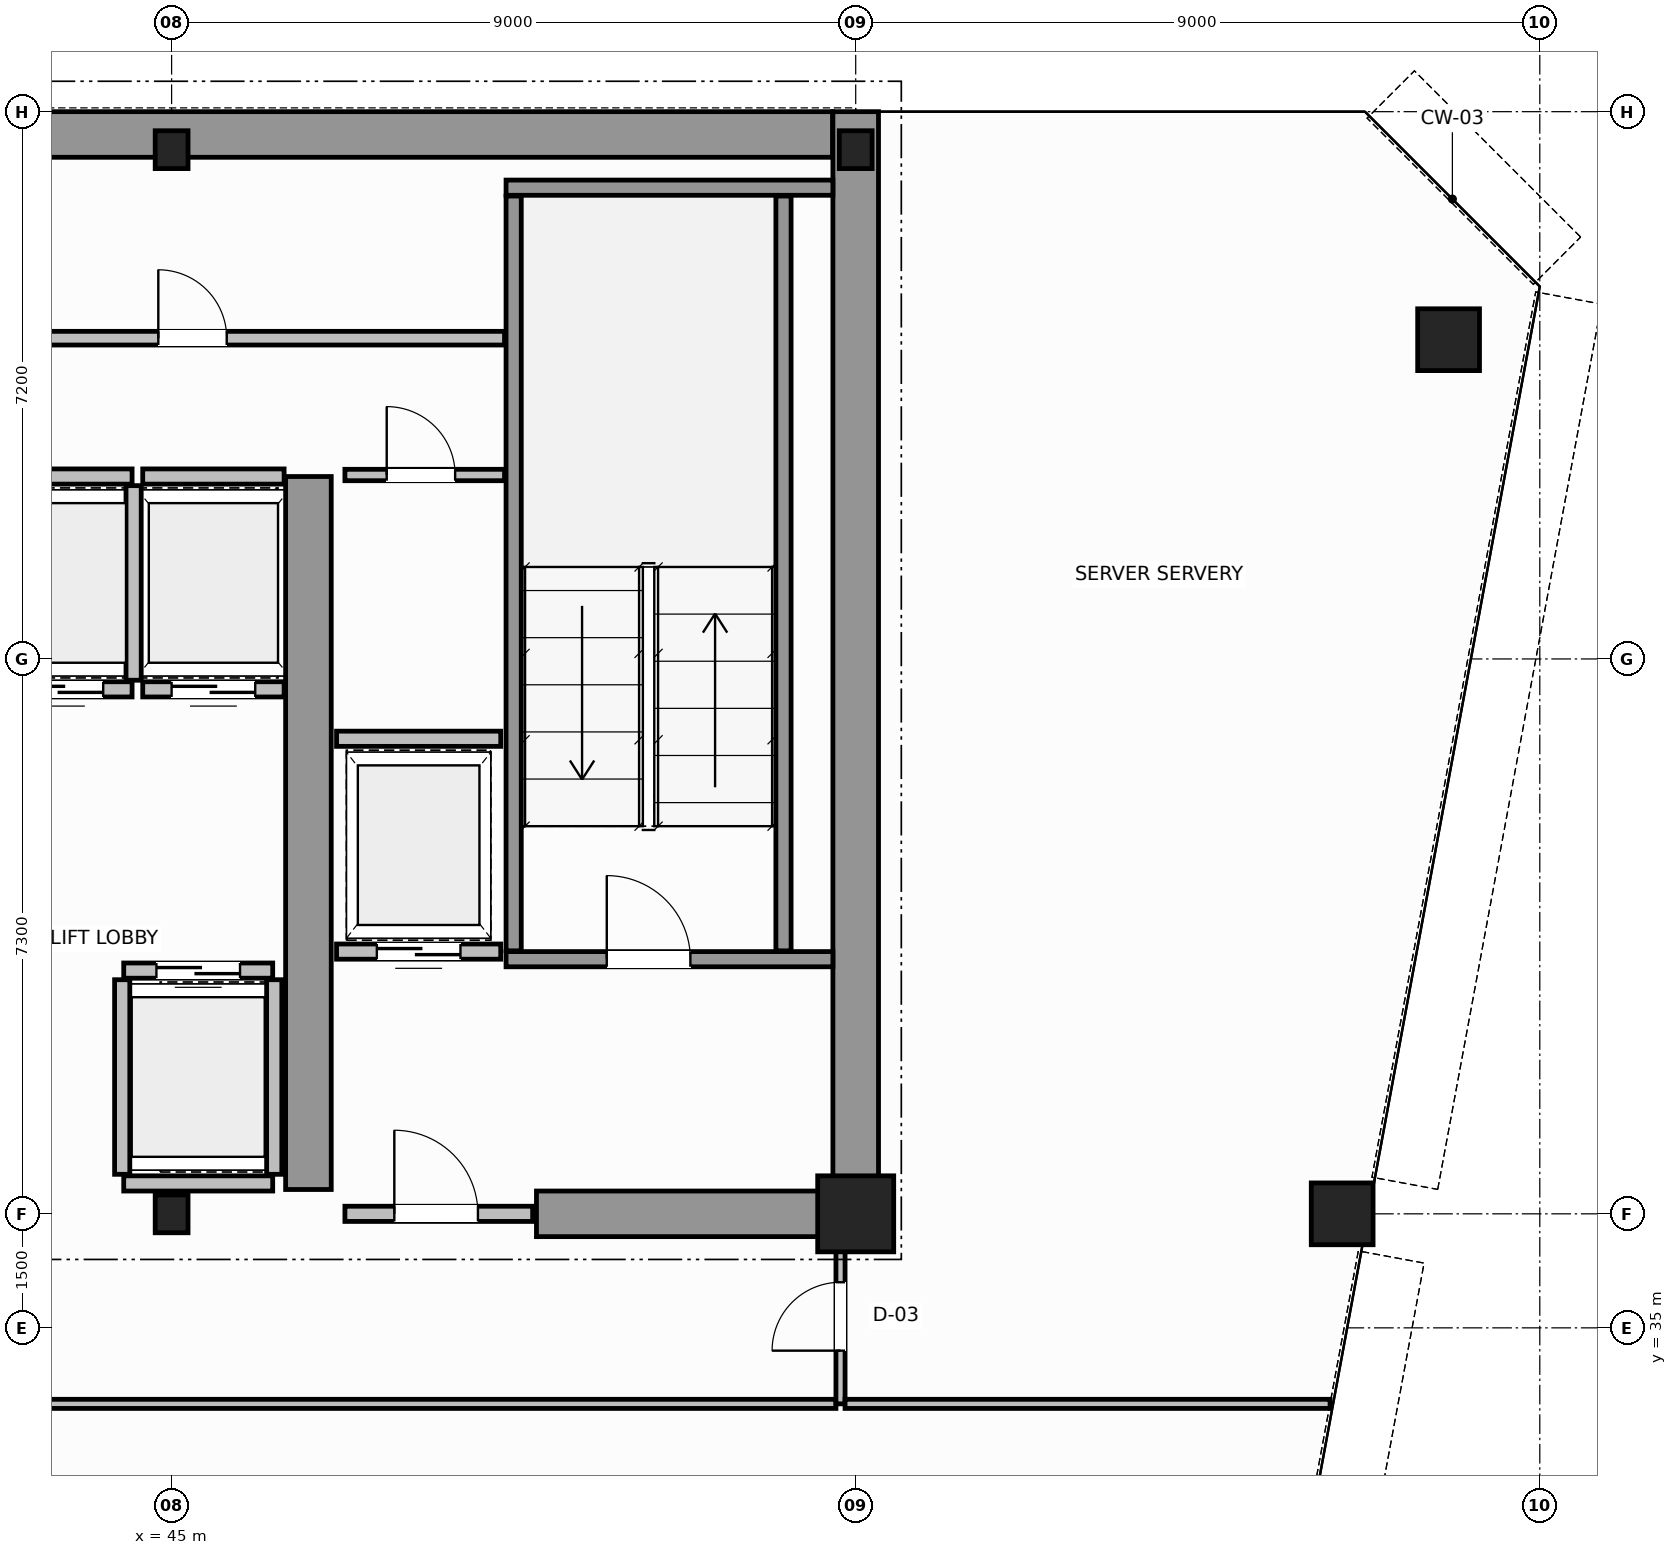
"""IFC4 building model, lengths in metres.
Left out: names, types, materials, properties, quantities, classifications, styles, units other than length and angle.
Written with IfcOpenShell. Run it as: python <this file> out.ifc"""

import sys

from ifc_helpers import new_model, si_unit, direction, frame, frame_2d, origin, origin_2d, place, context, subcontext, project, spatial, rectangle, hollow_circle, i_section, extrude, source, transform, mapped, element, fill, save


model = new_model("IFC4")
c1 = context("Model", 3, precision=1e-05, world=origin(), true_north=direction((0.0, 1.0)))
c2 = subcontext(c1, "Body", "Model", "MODEL_VIEW")
j1 = project(units=[si_unit("LENGTHUNIT", "METRE"), si_unit("PLANEANGLEUNIT", "RADIAN")], contexts=[c1])
p1 = place(None, origin())
s1 = spatial("IfcSite", under=j1, at=p1, CompositionType="ELEMENT")
p2 = place(p1, origin())
s2 = spatial("IfcBuilding", under=s1, at=p2, CompositionType="ELEMENT")
p3 = place(p2, frame((0.0, 0.0, 207.0)))
s3 = spatial("IfcBuildingStorey", under=s2, at=p3, CompositionType="ELEMENT", Elevation=207.0)
m1 = source(origin(), c2, "Body", "SweptSolid", [
    extrude(i_section(OverallWidth=0.432, OverallDepth=0.498, WebThickness=0.055, FlangeThickness=0.068, FilletRadius=0.015, at=origin_2d()), origin(), (0.0, 0.0, 1.0), 3.8),
])
p4 = place(p3, frame((45.0, 36.5, 0.0), z_axis=(0.0, 0.0, 1.0), x_axis=(1.0, 0.0, 0.0)))
e1 = element("IfcColumn", 1, at=p4, inside=s3, PredefinedType="COLUMN", context=c2, shape_type="MappedRepresentation", body=[
    mapped(m1, transform((0.0, 0.0, 0.0), scale=1.0)),
])
m2 = source(origin(), c2, "Body", "SweptSolid", [
    extrude(rectangle(XDim=1.0, YDim=1.0, at=origin_2d()), origin(), (0.0, 0.0, 1.0), 3.8),
])
p5 = place(p3, frame((54.0, 36.5, 0.0), z_axis=(0.0, 0.0, 1.0), x_axis=(1.0, 0.0, 0.0)))
e2 = element("IfcColumn", 2, at=p5, inside=s3, PredefinedType="COLUMN", context=c2, shape_type="MappedRepresentation", body=[
    mapped(m2, transform((0.0, 0.0, 0.0), scale=1.0)),
])
for number, where, z_axis, x_axis in (
    (3, (45.0, 50.5, 0.0), (0.0, 0.0, 1.0), (1.0, 0.0, 0.0)),
    (4, (54.0, 50.5, 0.0), (0.0, 0.0, 1.0), (1.0, 0.0, 0.0)),
):
    element("IfcColumn", number, at=place(p3, frame(where, z_axis=z_axis, x_axis=x_axis)), inside=s3, PredefinedType="COLUMN", context=c2, shape_type="MappedRepresentation", body=[
        mapped(m1, transform((0.0, 0.0, 0.0), scale=1.0)),
    ])
m3 = source(origin(), c2, "Body", "SweptSolid", [
    extrude(hollow_circle(Radius=0.406, WallThickness=0.04, at=origin_2d()), origin(), (0.0, 0.0, 1.0), 3.8),
])
for number, where, z_axis, x_axis in (
    (5, (61.8, 48.0, 0.0), (0.0, 0.0, 1.0), (1.0, 0.0, 0.0)),
    (6, (60.4, 36.5, 0.0), (0.0, 0.0, 1.0), (1.0, 0.0, 0.0)),
):
    element("IfcColumn", number, at=place(p3, frame(where, z_axis=z_axis, x_axis=x_axis)), inside=s3, PredefinedType="COLUMN", context=c2, shape_type="MappedRepresentation", body=[
        mapped(m3, transform((0.0, 0.0, 0.0), scale=1.0)),
    ])
p6 = place(p3, frame((34.002, 50.7, 0.0), z_axis=(0.0, 0.0, 1.0), x_axis=(1.0, 0.0, 0.0)))
e7 = element("IfcWall", 7, at=p6, inside=s3, PredefinedType="SHEAR", context=c2, shape_type="SweptSolid", body=[
    extrude(rectangle(XDim=19.694, YDim=0.6, at=frame_2d((9.847, 0.0))), origin(), (0.0, 0.0, 1.0), 3.8),
])
p7 = place(p3, frame((54.0, 36.5, 0.0), z_axis=(0.0, 0.0, 1.0), x_axis=(0.0, 1.0, 0.0)))
e8 = element("IfcWall", 8, at=p7, inside=s3, PredefinedType="SHEAR", context=c2, shape_type="SweptSolid", body=[
    extrude(rectangle(XDim=14.5, YDim=0.6, at=frame_2d((7.25, 0.0))), origin(), (0.0, 0.0, 1.0), 3.8),
])
p8 = place(p3, frame((49.8, 36.5, 0.0), z_axis=(0.0, 0.0, 1.0), x_axis=(1.0, 0.0, 0.0)))
e9 = element("IfcWall", 9, at=p8, inside=s3, PredefinedType="SHEAR", context=c2, shape_type="SweptSolid", body=[
    extrude(rectangle(XDim=3.88, YDim=0.6, at=frame_2d((1.94, 0.0))), origin(), (0.0, 0.0, 1.0), 2.58),
])
p9 = place(p3, frame((46.8, 36.82, 0.0), z_axis=(0.0, 0.0, 1.0), x_axis=(0.0, 1.0, 0.0)))
e10 = element("IfcWall", 10, at=p9, inside=s3, PredefinedType="SHEAR", context=c2, shape_type="SweptSolid", body=[
    extrude(rectangle(XDim=9.38, YDim=0.6, at=frame_2d((4.69, 0.0))), origin(), (0.0, 0.0, 1.0), 3.8),
])
p10 = place(p3, frame((49.4, 39.85, 0.0), z_axis=(0.0, 0.0, 1.0), x_axis=(1.0, 0.0, 0.0)))
e11 = element("IfcWall", 11, at=p10, inside=s3, PredefinedType="SOLIDWALL", context=c2, shape_type="SweptSolid", body=[
    extrude(rectangle(XDim=4.3, YDim=0.2, at=frame_2d((2.15, 0.0))), origin(), (0.0, 0.0, 1.0), 3.8),
])
p11 = place(p10, frame((1.325, 0.0, 0.0)))
e12 = element("IfcOpeningElement", 12, at=p11, cuts=e11, PredefinedType="OPENING", context=c2, shape_type="SweptSolid", body=[
    extrude(rectangle(XDim=1.1, YDim=2.15, at=frame_2d((0.55, 1.075))), frame((0.0, 0.11, 0.0), z_axis=(0.0, -1.0, 0.0), x_axis=(1.0, 0.0, 0.0)), (0.0, 0.0, 1.0), 0.22),
])
p12 = place(p3, frame((49.4, 50.0, 0.0), z_axis=(0.0, 0.0, 1.0), x_axis=(1.0, 0.0, 0.0)))
e13 = element("IfcWall", 13, at=p12, inside=s3, PredefinedType="SOLIDWALL", context=c2, shape_type="SweptSolid", body=[
    extrude(rectangle(XDim=4.3, YDim=0.2, at=frame_2d((2.15, 0.0))), origin(), (0.0, 0.0, 1.0), 3.8),
])
for number, where, z_axis, x_axis in (
    (14, (49.5, 39.96, 0.0), (0.0, 0.0, 1.0), (0.0, 1.0, 0.0)),
    (15, (53.05, 39.96, 0.0), (0.0, 0.0, 1.0), (0.0, 1.0, 0.0)),
):
    element("IfcWall", number, at=place(p3, frame(where, z_axis=z_axis, x_axis=x_axis)), inside=s3, PredefinedType="SOLIDWALL", context=c2, shape_type="SweptSolid", body=[
        extrude(rectangle(XDim=9.93, YDim=0.2, at=frame_2d((4.965, 0.0))), origin(), (0.0, 0.0, 1.0), 3.8),
    ])
p13 = place(p3, frame((47.28, 36.5, 0.0), z_axis=(0.0, 0.0, 1.0), x_axis=(1.0, 0.0, 0.0)))
e16 = element("IfcWall", 16, at=p13, inside=s3, PredefinedType="SOLIDWALL", context=c2, shape_type="SweptSolid", body=[
    extrude(rectangle(XDim=2.47, YDim=0.2, at=frame_2d((1.235, 0.0))), origin(), (0.0, 0.0, 1.0), 2.57),
])
p14 = place(p13, frame((0.65, 0.0, 0.0)))
e17 = element("IfcOpeningElement", 17, at=p14, cuts=e16, PredefinedType="OPENING", context=c2, shape_type="SweptSolid", body=[
    extrude(rectangle(XDim=1.1, YDim=2.15, at=frame_2d((0.55, 1.075))), frame((0.0, 0.11, 0.0), z_axis=(0.0, -1.0, 0.0), x_axis=(1.0, 0.0, 0.0)), (0.0, 0.0, 1.0), 0.22),
])
p15 = place(p3, frame((44.37, 39.7, 0.0), z_axis=(0.0, 0.0, 1.0), x_axis=(1.0, 0.0, 0.0)))
e18 = element("IfcWall", 18, at=p15, inside=s3, PredefinedType="SOLIDWALL", context=c2, shape_type="SweptSolid", body=[
    extrude(rectangle(XDim=1.96, YDim=0.2, at=frame_2d((0.98, 0.0))), origin(), (0.0, 0.0, 1.0), 3.58),
])
p16 = place(p15, frame((0.43, 0.0, 0.0)))
e19 = element("IfcOpeningElement", 19, at=p16, cuts=e18, PredefinedType="OPENING", context=c2, shape_type="SweptSolid", body=[
    extrude(rectangle(XDim=1.1, YDim=2.15, at=frame_2d((0.55, 1.075))), frame((0.0, 0.11, 0.0), z_axis=(0.0, -1.0, 0.0), x_axis=(1.0, 0.0, 0.0)), (0.0, 0.0, 1.0), 0.22),
])
p17 = place(p3, frame((44.37, 36.9, 0.0), z_axis=(0.0, 0.0, 1.0), x_axis=(1.0, 0.0, 0.0)))
e20 = element("IfcWall", 20, at=p17, inside=s3, PredefinedType="SOLIDWALL", context=c2, shape_type="SweptSolid", body=[
    extrude(rectangle(XDim=1.96, YDim=0.2, at=frame_2d((0.98, 0.0))), origin(), (0.0, 0.0, 1.0), 2.57),
])
for number, where, z_axis, x_axis in (
    (21, (44.35, 37.02, 0.0), (0.0, 0.0, 1.0), (0.0, 1.0, 0.0)),
    (22, (46.35, 37.02, 0.0), (0.0, 0.0, 1.0), (0.0, 1.0, 0.0)),
):
    element("IfcWall", number, at=place(p3, frame(where, z_axis=z_axis, x_axis=x_axis)), inside=s3, PredefinedType="SOLIDWALL", context=c2, shape_type="SweptSolid", body=[
        extrude(rectangle(XDim=2.56, YDim=0.2, at=frame_2d((1.28, 0.0))), origin(), (0.0, 0.0, 1.0), 3.58),
    ])
p18 = place(p3, frame((42.62, 43.4, 0.0), z_axis=(0.0, 0.0, 1.0), x_axis=(1.0, 0.0, 0.0)))
e23 = element("IfcWall", 23, at=p18, inside=s3, PredefinedType="SOLIDWALL", context=c2, shape_type="SweptSolid", body=[
    extrude(rectangle(XDim=1.86, YDim=0.2, at=frame_2d((0.93, 0.0))), origin(), (0.0, 0.0, 1.0), 3.58),
])
p19 = place(p18, frame((0.38, 0.0, 0.0)))
e24 = element("IfcOpeningElement", 24, at=p19, cuts=e23, PredefinedType="OPENING", context=c2, shape_type="SweptSolid", body=[
    extrude(rectangle(XDim=1.1, YDim=2.15, at=frame_2d((0.55, 1.075))), frame((0.0, 0.11, 0.0), z_axis=(0.0, -1.0, 0.0), x_axis=(1.0, 0.0, 0.0)), (0.0, 0.0, 1.0), 0.22),
])
p20 = place(p3, frame((42.62, 46.2, 0.0), z_axis=(0.0, 0.0, 1.0), x_axis=(1.0, 0.0, 0.0)))
e25 = element("IfcWall", 25, at=p20, inside=s3, PredefinedType="SOLIDWALL", context=c2, shape_type="SweptSolid", body=[
    extrude(rectangle(XDim=1.86, YDim=0.2, at=frame_2d((0.93, 0.0))), origin(), (0.0, 0.0, 1.0), 3.58),
])
p21 = place(p3, frame((44.5, 43.52, 0.0), z_axis=(0.0, 0.0, 1.0), x_axis=(0.0, 1.0, 0.0)))
e26 = element("IfcWall", 26, at=p21, inside=s3, PredefinedType="SOLIDWALL", context=c2, shape_type="SweptSolid", body=[
    extrude(rectangle(XDim=2.56, YDim=0.2, at=frame_2d((1.28, 0.0))), origin(), (0.0, 0.0, 1.0), 3.58),
])
p22 = place(p3, frame((44.62, 43.4, 0.0), z_axis=(0.0, 0.0, 1.0), x_axis=(1.0, 0.0, 0.0)))
e27 = element("IfcWall", 27, at=p22, inside=s3, PredefinedType="SOLIDWALL", context=c2, shape_type="SweptSolid", body=[
    extrude(rectangle(XDim=1.86, YDim=0.2, at=frame_2d((0.93, 0.0))), origin(), (0.0, 0.0, 1.0), 3.58),
])
p23 = place(p22, frame((0.38, 0.0, 0.0)))
e28 = element("IfcOpeningElement", 28, at=p23, cuts=e27, PredefinedType="OPENING", context=c2, shape_type="SweptSolid", body=[
    extrude(rectangle(XDim=1.1, YDim=2.15, at=frame_2d((0.55, 1.075))), frame((0.0, 0.11, 0.0), z_axis=(0.0, -1.0, 0.0), x_axis=(1.0, 0.0, 0.0)), (0.0, 0.0, 1.0), 0.22),
])
p24 = place(p3, frame((44.62, 46.2, 0.0), z_axis=(0.0, 0.0, 1.0), x_axis=(1.0, 0.0, 0.0)))
e29 = element("IfcWall", 29, at=p24, inside=s3, PredefinedType="SOLIDWALL", context=c2, shape_type="SweptSolid", body=[
    extrude(rectangle(XDim=1.86, YDim=0.2, at=frame_2d((0.93, 0.0))), origin(), (0.0, 0.0, 1.0), 3.58),
])
p25 = place(p3, frame((47.17, 39.95, 0.0), z_axis=(0.0, 0.0, 1.0), x_axis=(1.0, 0.0, 0.0)))
e30 = element("IfcWall", 30, at=p25, inside=s3, PredefinedType="SOLIDWALL", context=c2, shape_type="SweptSolid", body=[
    extrude(rectangle(XDim=2.16, YDim=0.2, at=frame_2d((1.08, 0.0))), origin(), (0.0, 0.0, 1.0), 3.58),
])
p26 = place(p25, frame((0.53, 0.0, 0.0)))
e31 = element("IfcOpeningElement", 31, at=p26, cuts=e30, PredefinedType="OPENING", context=c2, shape_type="SweptSolid", body=[
    extrude(rectangle(XDim=1.1, YDim=2.15, at=frame_2d((0.55, 1.075))), frame((0.0, 0.11, 0.0), z_axis=(0.0, -1.0, 0.0), x_axis=(1.0, 0.0, 0.0)), (0.0, 0.0, 1.0), 0.22),
])
p27 = place(p3, frame((47.17, 42.75, 0.0), z_axis=(0.0, 0.0, 1.0), x_axis=(1.0, 0.0, 0.0)))
e32 = element("IfcWall", 32, at=p27, inside=s3, PredefinedType="SOLIDWALL", context=c2, shape_type="SweptSolid", body=[
    extrude(rectangle(XDim=2.16, YDim=0.2, at=frame_2d((1.08, 0.0))), origin(), (0.0, 0.0, 1.0), 3.58),
])
p28 = place(p3, frame((47.28, 46.22, 0.0), z_axis=(0.0, 0.0, 1.0), x_axis=(1.0, 0.0, 0.0)))
e33 = element("IfcWall", 33, at=p28, inside=s3, PredefinedType="PARTITIONING", context=c2, shape_type="SweptSolid", body=[
    extrude(rectangle(XDim=2.1, YDim=0.15, at=frame_2d((1.05, 0.0))), origin(), (0.0, 0.0, 1.0), 3.58),
])
p29 = place(p28, frame((0.55, 0.0, 0.0)))
e34 = element("IfcOpeningElement", 34, at=p29, cuts=e33, PredefinedType="OPENING", context=c2, shape_type="SweptSolid", body=[
    extrude(rectangle(XDim=0.9, YDim=2.1, at=frame_2d((0.45, 1.05))), frame((0.0, 0.085, 0.0), z_axis=(0.0, -1.0, 0.0), x_axis=(1.0, 0.0, 0.0)), (0.0, 0.0, 1.0), 0.17),
])
p30 = place(p3, frame((18.62, 48.02, 0.0), z_axis=(0.0, 0.0, 1.0), x_axis=(1.0, 0.0, 0.0)))
e35 = element("IfcWall", 35, at=p30, inside=s3, PredefinedType="PLUMBINGWALL", context=c2, shape_type="SweptSolid", body=[
    extrude(rectangle(XDim=30.76, YDim=0.18, at=frame_2d((15.38, 0.0))), origin(), (0.0, 0.0, 1.0), 3.58),
])
p31 = place(p30, frame((1.955, 0.0, 0.0)))
e36 = element("IfcOpeningElement", 36, at=p31, cuts=e35, PredefinedType="OPENING", context=c2, shape_type="SweptSolid", body=[
    extrude(rectangle(XDim=0.9, YDim=2.15, at=frame_2d((0.45, 1.075))), frame((0.0, 0.1, 0.0), z_axis=(0.0, -1.0, 0.0), x_axis=(1.0, 0.0, 0.0)), (0.0, 0.0, 1.0), 0.2),
])
p32 = place(p30, frame((8.03, 0.0, 0.0)))
e37 = element("IfcOpeningElement", 37, at=p32, cuts=e35, PredefinedType="OPENING", context=c2, shape_type="SweptSolid", body=[
    extrude(rectangle(XDim=0.9, YDim=2.15, at=frame_2d((0.45, 1.075))), frame((0.0, 0.1, 0.0), z_axis=(0.0, -1.0, 0.0), x_axis=(1.0, 0.0, 0.0)), (0.0, 0.0, 1.0), 0.2),
])
p33 = place(p30, frame((16.93, 0.0, 0.0)))
e38 = element("IfcOpeningElement", 38, at=p33, cuts=e35, PredefinedType="OPENING", context=c2, shape_type="SweptSolid", body=[
    extrude(rectangle(XDim=0.9, YDim=2.15, at=frame_2d((0.45, 1.075))), frame((0.0, 0.1, 0.0), z_axis=(0.0, -1.0, 0.0), x_axis=(1.0, 0.0, 0.0)), (0.0, 0.0, 1.0), 0.2),
])
p34 = place(p30, frame((26.205, 0.0, 0.0)))
e39 = element("IfcOpeningElement", 39, at=p34, cuts=e35, PredefinedType="OPENING", context=c2, shape_type="SweptSolid", body=[
    extrude(rectangle(XDim=0.9, YDim=2.15, at=frame_2d((0.45, 1.075))), frame((0.0, 0.1, 0.0), z_axis=(0.0, -1.0, 0.0), x_axis=(1.0, 0.0, 0.0)), (0.0, 0.0, 1.0), 0.2),
])
p35 = place(p3, frame((37.66, 34.0, 0.0), z_axis=(0.0, 0.0, 1.0), x_axis=(1.0, 0.0, 0.0)))
e40 = element("IfcWall", 40, at=p35, inside=s3, PredefinedType="PARTITIONING", context=c2, shape_type="SweptSolid", body=[
    extrude(rectangle(XDim=16.08, YDim=0.12, at=frame_2d((8.04, 0.0))), origin(), (0.0, 0.0, 1.0), 3.58),
])
p36 = place(p3, frame((53.8, 34.0, 0.0), z_axis=(0.0, 0.0, 1.0), x_axis=(0.0, 1.0, 0.0)))
e41 = element("IfcWall", 41, at=p36, inside=s3, PredefinedType="PARTITIONING", context=c2, shape_type="SweptSolid", body=[
    extrude(rectangle(XDim=2.44, YDim=0.12, at=frame_2d((1.22, 0.0))), origin(), (0.0, 0.0, 1.0), 3.58),
])
p37 = place(p36, frame((0.7, 0.0, 0.0)))
e42 = element("IfcOpeningElement", 42, at=p37, cuts=e41, PredefinedType="OPENING", context=c2, shape_type="SweptSolid", body=[
    extrude(rectangle(XDim=0.9, YDim=2.15, at=frame_2d((0.45, 1.075))), frame((0.0, 0.07, 0.0), z_axis=(0.0, -1.0, 0.0), x_axis=(1.0, 0.0, 0.0)), (0.0, 0.0, 1.0), 0.14),
])
p38 = place(p3, frame((53.86, 34.0, 0.0), z_axis=(0.0, 0.0, 1.0), x_axis=(1.0, 0.0, 0.0)))
e43 = element("IfcWall", 43, at=p38, inside=s3, PredefinedType="PARTITIONING", context=c2, shape_type="SweptSolid", body=[
    extrude(rectangle(XDim=6.381, YDim=0.12, at=frame_2d((3.19, 0.0))), origin(), (0.0, 0.0, 1.0), 3.58),
])
m4 = source(origin(), c2, "Body", "SweptSolid", [
    extrude(rectangle(XDim=1.1, YDim=2.15, at=frame_2d((0.55, 1.075))), frame((0.0, 0.025, 0.0), z_axis=(0.0, -1.0, 0.0), x_axis=(1.0, 0.0, 0.0)), (0.0, 0.0, 1.0), 0.05),
])
p39 = place(p11, origin())
e44 = element("IfcDoor", 44, at=p39, inside=s3, OperationType="SINGLE_SWING_RIGHT", PredefinedType="DOOR", context=c2, shape_type="MappedRepresentation", body=[
    mapped(m4, transform((0.0, 0.0, 0.0), scale=1.0)),
])
fill(e12, e44)
p40 = place(p14, origin())
e45 = element("IfcDoor", 45, at=p40, inside=s3, OperationType="SINGLE_SWING_LEFT", PredefinedType="DOOR", context=c2, shape_type="MappedRepresentation", body=[
    mapped(m4, transform((0.0, 0.0, 0.0), scale=1.0)),
])
fill(e17, e45)
p41 = place(p16, origin())
e46 = element("IfcDoor", 46, at=p41, inside=s3, OperationType="DOUBLE_DOOR_SLIDING", PredefinedType="DOOR", context=c2, shape_type="MappedRepresentation", body=[
    mapped(m4, transform((0.0, 0.0, 0.0), scale=1.0)),
])
fill(e19, e46)
p42 = place(p19, origin())
e47 = element("IfcDoor", 47, at=p42, inside=s3, OperationType="DOUBLE_DOOR_SLIDING", PredefinedType="DOOR", context=c2, shape_type="MappedRepresentation", body=[
    mapped(m4, transform((0.0, 0.0, 0.0), scale=1.0)),
])
fill(e24, e47)
p43 = place(p23, origin())
e48 = element("IfcDoor", 48, at=p43, inside=s3, OperationType="DOUBLE_DOOR_SLIDING", PredefinedType="DOOR", context=c2, shape_type="MappedRepresentation", body=[
    mapped(m4, transform((0.0, 0.0, 0.0), scale=1.0)),
])
fill(e28, e48)
p44 = place(p26, origin())
e49 = element("IfcDoor", 49, at=p44, inside=s3, OperationType="DOUBLE_DOOR_SLIDING", PredefinedType="DOOR", context=c2, shape_type="MappedRepresentation", body=[
    mapped(m4, transform((0.0, 0.0, 0.0), scale=1.0)),
])
fill(e31, e49)
m5 = source(origin(), c2, "Body", "SweptSolid", [
    extrude(rectangle(XDim=0.9, YDim=2.1, at=frame_2d((0.45, 1.05))), frame((0.0, 0.025, 0.0), z_axis=(0.0, -1.0, 0.0), x_axis=(1.0, 0.0, 0.0)), (0.0, 0.0, 1.0), 0.05),
])
p45 = place(p29, origin())
e50 = element("IfcDoor", 50, at=p45, inside=s3, OperationType="SINGLE_SWING_RIGHT", PredefinedType="DOOR", context=c2, shape_type="MappedRepresentation", body=[
    mapped(m5, transform((0.0, 0.0, 0.0), scale=1.0)),
])
fill(e34, e50)
m6 = source(origin(), c2, "Body", "SweptSolid", [
    extrude(rectangle(XDim=0.9, YDim=2.15, at=frame_2d((0.45, 1.075))), frame((0.0, 0.025, 0.0), z_axis=(0.0, -1.0, 0.0), x_axis=(1.0, 0.0, 0.0)), (0.0, 0.0, 1.0), 0.05),
])
p46 = place(p34, origin())
e51 = element("IfcDoor", 51, at=p46, inside=s3, OperationType="SINGLE_SWING_RIGHT", PredefinedType="DOOR", context=c2, shape_type="MappedRepresentation", body=[
    mapped(m6, transform((0.0, 0.0, 0.0), scale=1.0)),
])
fill(e39, e51)
p47 = place(p37, origin())
e52 = element("IfcDoor", 52, at=p47, inside=s3, OperationType="SINGLE_SWING_RIGHT", PredefinedType="DOOR", context=c2, shape_type="MappedRepresentation", body=[
    mapped(m6, transform((0.0, 0.0, 0.0), scale=1.0)),
])
fill(e42, e52)
save(model, sys.argv[1])
